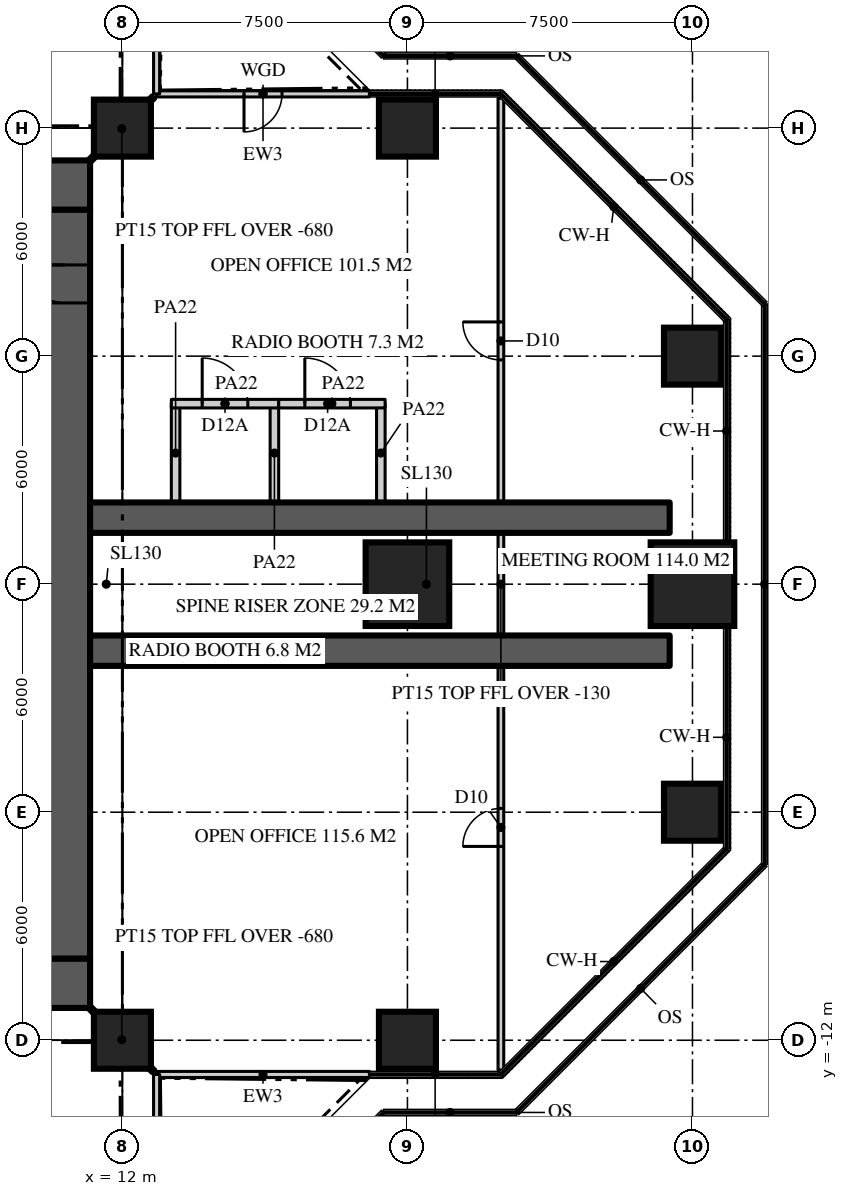
"""IFC4 building model, lengths in metres.
Left out: names, types, materials, properties, quantities, classifications, styles, units other than length and angle.
Written with IfcOpenShell. Run it as: python <this file> out.ifc"""

import sys

from ifc_helpers import new_model, si_unit, direction, frame, frame_2d, origin, origin_2d, place, context, subcontext, project, spatial, rectangle, extrude, element, fill, save


model = new_model("IFC4")
c1 = context("Model", 3, precision=1e-05, world=origin(), true_north=direction((0.0, 1.0)))
c2 = subcontext(c1, "Body", "Model", "MODEL_VIEW")
j1 = project(units=[si_unit("LENGTHUNIT", "METRE"), si_unit("PLANEANGLEUNIT", "RADIAN")], contexts=[c1])
p1 = place(None, origin())
s1 = spatial("IfcSite", under=j1, at=p1, CompositionType="ELEMENT")
p2 = place(p1, origin())
s2 = spatial("IfcBuilding", under=s1, at=p2, CompositionType="ELEMENT")
p3 = place(p2, frame((0.0, 0.0, 212.7)))
s3 = spatial("IfcBuildingStorey", under=s2, at=p3, CompositionType="ELEMENT", Elevation=212.7)
p4 = place(p3, frame((-11.15, 10.5, 0.0), z_axis=(0.0, 0.0, 1.0), x_axis=(1.0, 0.0, 0.0)))
e1 = element("IfcWall", 1, at=p4, inside=s3, PredefinedType="SHEAR", context=c2, shape_type="SweptSolid", body=[
    extrude(rectangle(XDim=22.3, YDim=1.3, at=frame_2d((11.15, 0.0))), origin(), (0.0, 0.0, 1.0), 3.9),
])
p5 = place(p4, frame((4.25, 0.0, 0.0)))
e2 = element("IfcOpeningElement", 2, at=p5, cuts=e1, PredefinedType="OPENING", context=c2, shape_type="SweptSolid", body=[
    extrude(rectangle(XDim=1.8, YDim=2.2, at=frame_2d((0.9, 1.1))), frame((0.0, 0.66, 0.0), z_axis=(0.0, -1.0, 0.0), x_axis=(1.0, 0.0, 0.0)), (0.0, 0.0, 1.0), 1.32),
])
p6 = place(p4, frame((16.25, 0.0, 0.0)))
e3 = element("IfcOpeningElement", 3, at=p6, cuts=e1, PredefinedType="OPENING", context=c2, shape_type="SweptSolid", body=[
    extrude(rectangle(XDim=1.8, YDim=2.2, at=frame_2d((0.9, 1.1))), frame((0.0, 0.66, 0.0), z_axis=(0.0, -1.0, 0.0), x_axis=(1.0, 0.0, 0.0)), (0.0, 0.0, 1.0), 1.32),
])
p7 = place(p3, frame((11.15, -10.5, 0.0), z_axis=(0.0, 0.0, 1.0), x_axis=(-1.0, 0.0, 0.0)))
e4 = element("IfcWall", 4, at=p7, inside=s3, PredefinedType="SHEAR", context=c2, shape_type="SweptSolid", body=[
    extrude(rectangle(XDim=22.3, YDim=1.3, at=frame_2d((11.15, 0.0))), origin(), (0.0, 0.0, 1.0), 3.9),
])
p8 = place(p7, frame((16.25, 0.0, 0.0)))
e5 = element("IfcOpeningElement", 5, at=p8, cuts=e4, PredefinedType="OPENING", context=c2, shape_type="SweptSolid", body=[
    extrude(rectangle(XDim=1.8, YDim=2.2, at=frame_2d((0.9, 1.1))), frame((0.0, 0.66, 0.0), z_axis=(0.0, -1.0, 0.0), x_axis=(1.0, 0.0, 0.0)), (0.0, 0.0, 1.0), 1.32),
])
p9 = place(p7, frame((4.25, 0.0, 0.0)))
e6 = element("IfcOpeningElement", 6, at=p9, cuts=e4, PredefinedType="OPENING", context=c2, shape_type="SweptSolid", body=[
    extrude(rectangle(XDim=1.8, YDim=2.2, at=frame_2d((0.9, 1.1))), frame((0.0, 0.66, 0.0), z_axis=(0.0, -1.0, 0.0), x_axis=(1.0, 0.0, 0.0)), (0.0, 0.0, 1.0), 1.32),
])
p10 = place(p3, frame((10.5, -9.85, 0.0), z_axis=(0.0, 0.0, 1.0), x_axis=(0.0, 1.0, 0.0)))
e7 = element("IfcWall", 7, at=p10, inside=s3, PredefinedType="SHEAR", context=c2, shape_type="SweptSolid", body=[
    extrude(rectangle(XDim=19.7, YDim=1.3, at=frame_2d((9.85, 0.0))), origin(), (0.0, 0.0, 1.0), 3.9),
])
p11 = place(p10, frame((17.25, 0.0, 0.0)))
e8 = element("IfcOpeningElement", 8, at=p11, cuts=e7, PredefinedType="OPENING", context=c2, shape_type="SweptSolid", body=[
    extrude(rectangle(XDim=1.0, YDim=2.2, at=frame_2d((0.5, 1.1))), frame((0.0, 0.66, 0.0), z_axis=(0.0, -1.0, 0.0), x_axis=(1.0, 0.0, 0.0)), (0.0, 0.0, 1.0), 1.32),
])
for number, where, z_axis, x_axis in (
    (9, (11.15, -1.75, 0.0), (0.0, 0.0, 1.0), (1.0, 0.0, 0.0)),
    (10, (11.15, 1.75, 0.0), (0.0, 0.0, 1.0), (1.0, 0.0, 0.0)),
):
    element("IfcWall", number, at=place(p3, frame(where, z_axis=z_axis, x_axis=x_axis)), inside=s3, PredefinedType="SHEAR", context=c2, shape_type="SweptSolid", body=[
        extrude(rectangle(XDim=15.25, YDim=0.8, at=frame_2d((7.625, 0.0))), origin(), (0.0, 0.0, 1.0), 3.9),
    ])
for number, where, z_axis, x_axis in (
    (11, (12.0, -12.0, 0.0), (0.0, 0.0, 1.0), (1.0, 0.0, 0.0)),
    (12, (19.5, -12.0, 0.0), (0.0, 0.0, 1.0), (1.0, 0.0, 0.0)),
    (13, (27.0, -6.0, 0.0), (0.0, 0.0, 1.0), (1.0, 0.0, 0.0)),
):
    element("IfcColumn", number, at=place(p3, frame(where, z_axis=z_axis, x_axis=x_axis)), inside=s3, PredefinedType="COLUMN", context=c2, shape_type="SweptSolid", body=[
        extrude(rectangle(XDim=1.5, YDim=1.5, at=origin_2d()), origin(), (0.0, 0.0, 1.0), 3.9),
    ])
for number, where, z_axis, x_axis in (
    (14, (19.5, 0.0, 0.0), (0.0, 0.0, 1.0), (1.0, 0.0, 0.0)),
    (15, (27.0, 0.0, 0.0), (0.0, 0.0, 1.0), (1.0, 0.0, 0.0)),
):
    element("IfcColumn", number, at=place(p3, frame(where, z_axis=z_axis, x_axis=x_axis)), inside=s3, PredefinedType="COLUMN", context=c2, shape_type="SweptSolid", body=[
        extrude(rectangle(XDim=2.2, YDim=2.2, at=origin_2d()), origin(), (0.0, 0.0, 1.0), 3.9),
    ])
for number, where, z_axis, x_axis in (
    (16, (27.0, 6.0, 0.0), (0.0, 0.0, 1.0), (1.0, 0.0, 0.0)),
    (17, (12.0, 12.0, 0.0), (0.0, 0.0, 1.0), (1.0, 0.0, 0.0)),
    (18, (19.5, 12.0, 0.0), (0.0, 0.0, 1.0), (1.0, 0.0, 0.0)),
):
    element("IfcColumn", number, at=place(p3, frame(where, z_axis=z_axis, x_axis=x_axis)), inside=s3, PredefinedType="COLUMN", context=c2, shape_type="SweptSolid", body=[
        extrude(rectangle(XDim=1.5, YDim=1.5, at=origin_2d()), origin(), (0.0, 0.0, 1.0), 3.9),
    ])
p12 = place(p3, frame((12.9, -12.9, 0.0), z_axis=(0.0, 0.0, 1.0), x_axis=(1.0, 0.0, 0.0)))
e19 = element("IfcWall", 19, at=p12, inside=s3, PredefinedType="SOLIDWALL", context=c2, shape_type="SweptSolid", body=[
    extrude(rectangle(XDim=5.6, YDim=0.16, at=frame_2d((2.8, 0.0))), origin(), (0.0, 0.0, 1.0), 3.77),
])
p13 = place(p3, frame((18.5, 12.9, 0.0), z_axis=(0.0, 0.0, 1.0), x_axis=(-1.0, 0.0, 0.0)))
e20 = element("IfcWall", 20, at=p13, inside=s3, PredefinedType="SOLIDWALL", context=c2, shape_type="SweptSolid", body=[
    extrude(rectangle(XDim=5.6, YDim=0.16, at=frame_2d((2.8, 0.0))), origin(), (0.0, 0.0, 1.0), 3.77),
])
p14 = place(p13, frame((2.3, 0.0, 0.0)))
e21 = element("IfcOpeningElement", 21, at=p14, cuts=e20, PredefinedType="OPENING", context=c2, shape_type="SweptSolid", body=[
    extrude(rectangle(XDim=1.0, YDim=2.2, at=frame_2d((0.5, 1.1))), frame((0.0, 0.09, 0.0), z_axis=(0.0, -1.0, 0.0), x_axis=(1.0, 0.0, 0.0)), (0.0, 0.0, 1.0), 0.18),
])
p15 = place(p3, frame((12.9, 12.9, 0.0), z_axis=(0.0, 0.0, 1.0), x_axis=(0.0, 1.0, 0.0)))
e22 = element("IfcWall", 22, at=p15, inside=s3, PredefinedType="SOLIDWALL", context=c2, shape_type="SweptSolid", body=[
    extrude(rectangle(XDim=5.6, YDim=0.16, at=frame_2d((2.8, 0.0))), origin(), (0.0, 0.0, 1.0), 3.77),
])
p16 = place(p3, frame((12.9, -18.5, 0.0), z_axis=(0.0, 0.0, 1.0), x_axis=(0.0, 1.0, 0.0)))
e23 = element("IfcWall", 23, at=p16, inside=s3, PredefinedType="SOLIDWALL", context=c2, shape_type="SweptSolid", body=[
    extrude(rectangle(XDim=5.6, YDim=0.16, at=frame_2d((2.8, 0.0))), origin(), (0.0, 0.0, 1.0), 3.77),
])
p17 = place(p16, frame((2.3, 0.0, 0.0)))
e24 = element("IfcOpeningElement", 24, at=p17, cuts=e23, PredefinedType="OPENING", context=c2, shape_type="SweptSolid", body=[
    extrude(rectangle(XDim=1.0, YDim=2.2, at=frame_2d((0.5, 1.1))), frame((0.0, 0.09, 0.0), z_axis=(0.0, -1.0, 0.0), x_axis=(1.0, 0.0, 0.0)), (0.0, 0.0, 1.0), 0.18),
])
p18 = place(p3, frame((21.959, -12.786, 0.0), z_axis=(0.0, 0.0, 1.0), x_axis=(0.0, 1.0, 0.0)))
e25 = element("IfcWall", 25, at=p18, inside=s3, PredefinedType="PARTITIONING", context=c2, shape_type="SweptSolid", body=[
    extrude(rectangle(XDim=25.573, YDim=0.15, at=frame_2d((12.786, 0.0))), origin(), (0.0, 0.0, 1.0), 3.77),
])
p19 = place(p18, frame((18.687, 0.0, 0.0)))
e26 = element("IfcOpeningElement", 26, at=p19, cuts=e25, PredefinedType="OPENING", context=c2, shape_type="SweptSolid", body=[
    extrude(rectangle(XDim=1.0, YDim=2.2, at=frame_2d((0.5, 1.1))), frame((0.0, 0.085, 0.0), z_axis=(0.0, -1.0, 0.0), x_axis=(1.0, 0.0, 0.0)), (0.0, 0.0, 1.0), 0.17),
])
p20 = place(p18, frame((5.886, 0.0, 0.0)))
e27 = element("IfcOpeningElement", 27, at=p20, cuts=e25, PredefinedType="OPENING", context=c2, shape_type="SweptSolid", body=[
    extrude(rectangle(XDim=1.0, YDim=2.2, at=frame_2d((0.5, 1.1))), frame((0.0, 0.085, 0.0), z_axis=(0.0, -1.0, 0.0), x_axis=(1.0, 0.0, 0.0)), (0.0, 0.0, 1.0), 0.17),
])
for number, where, z_axis, x_axis in (
    (28, (13.4, 2.15, 0.0), (0.0, 0.0, 1.0), (0.0, 1.0, 0.0)),
    (29, (16.0, 2.15, 0.0), (0.0, 0.0, 1.0), (0.0, 1.0, 0.0)),
):
    element("IfcWall", number, at=place(p3, frame(where, z_axis=z_axis, x_axis=x_axis)), inside=s3, PredefinedType="PARTITIONING", context=c2, shape_type="SweptSolid", body=[
        extrude(rectangle(XDim=2.6, YDim=0.225, at=frame_2d((1.3, 0.0))), origin(), (0.0, 0.0, 1.0), 3.77),
    ])
p21 = place(p3, frame((13.288, 4.75, 0.0), z_axis=(0.0, 0.0, 1.0), x_axis=(1.0, 0.0, 0.0)))
e30 = element("IfcWall", 30, at=p21, inside=s3, PredefinedType="PARTITIONING", context=c2, shape_type="SweptSolid", body=[
    extrude(rectangle(XDim=2.825, YDim=0.225, at=frame_2d((1.413, 0.0))), origin(), (0.0, 0.0, 1.0), 3.77),
])
p22 = place(p21, frame((0.812, 0.0, 0.0)))
e31 = element("IfcOpeningElement", 31, at=p22, cuts=e30, PredefinedType="OPENING", context=c2, shape_type="SweptSolid", body=[
    extrude(rectangle(XDim=1.2, YDim=2.2, at=frame_2d((0.6, 1.1))), frame((0.0, 0.123, 0.0), z_axis=(0.0, -1.0, 0.0), x_axis=(1.0, 0.0, 0.0)), (0.0, 0.0, 1.0), 0.245),
])
p23 = place(p3, frame((18.8, 2.15, 0.0), z_axis=(0.0, 0.0, 1.0), x_axis=(0.0, 1.0, 0.0)))
e32 = element("IfcWall", 32, at=p23, inside=s3, PredefinedType="PARTITIONING", context=c2, shape_type="SweptSolid", body=[
    extrude(rectangle(XDim=2.6, YDim=0.225, at=frame_2d((1.3, 0.0))), origin(), (0.0, 0.0, 1.0), 3.77),
])
p24 = place(p3, frame((16.113, 4.75, 0.0), z_axis=(0.0, 0.0, 1.0), x_axis=(1.0, 0.0, 0.0)))
e33 = element("IfcWall", 33, at=p24, inside=s3, PredefinedType="PARTITIONING", context=c2, shape_type="SweptSolid", body=[
    extrude(rectangle(XDim=2.8, YDim=0.225, at=frame_2d((1.4, 0.0))), origin(), (0.0, 0.0, 1.0), 3.77),
])
p25 = place(p24, frame((0.688, 0.0, 0.0)))
e34 = element("IfcOpeningElement", 34, at=p25, cuts=e33, PredefinedType="OPENING", context=c2, shape_type="SweptSolid", body=[
    extrude(rectangle(XDim=1.2, YDim=2.2, at=frame_2d((0.6, 1.1))), frame((0.0, 0.123, 0.0), z_axis=(0.0, -1.0, 0.0), x_axis=(1.0, 0.0, 0.0)), (0.0, 0.0, 1.0), 0.245),
])
for number, where, z_axis, x_axis in (
    (35, (11.15, 11.15, 0.0), (0.0, 0.0, 1.0), (0.707, 0.707, 0.0)),
    (36, (11.15, -11.15, 0.0), (0.0, 0.0, 1.0), (0.707, -0.707, 0.0)),
):
    element("IfcWall", number, at=place(p3, frame(where, z_axis=z_axis, x_axis=x_axis)), inside=s3, PredefinedType="PARTITIONING", context=c2, shape_type="SweptSolid", body=[
        extrude(rectangle(XDim=2.362, YDim=0.15, at=frame_2d((1.181, 0.0))), origin(), (0.0, 0.0, 1.0), 3.22),
    ])
p26 = place(p14, origin())
e37 = element("IfcDoor", 37, at=p26, inside=s3, OperationType="SINGLE_SWING_RIGHT", PredefinedType="DOOR", context=c2, shape_type="SweptSolid", body=[
    extrude(rectangle(XDim=1.0, YDim=2.2, at=frame_2d((0.5, 1.1))), frame((0.0, 0.025, 0.0), z_axis=(0.0, -1.0, 0.0), x_axis=(1.0, 0.0, 0.0)), (0.0, 0.0, 1.0), 0.05),
])
fill(e21, e37)
p27 = place(p11, origin())
e38 = element("IfcDoor", 38, at=p27, inside=s3, OperationType="SINGLE_SWING_RIGHT", PredefinedType="DOOR", context=c2, shape_type="SweptSolid", body=[
    extrude(rectangle(XDim=1.0, YDim=2.2, at=frame_2d((0.5, 1.1))), frame((0.0, 0.025, 0.0), z_axis=(0.0, -1.0, 0.0), x_axis=(1.0, 0.0, 0.0)), (0.0, 0.0, 1.0), 0.05),
])
fill(e8, e38)
p28 = place(p19, origin())
e39 = element("IfcDoor", 39, at=p28, inside=s3, OperationType="SINGLE_SWING_RIGHT", PredefinedType="DOOR", context=c2, shape_type="SweptSolid", body=[
    extrude(rectangle(XDim=1.0, YDim=2.2, at=frame_2d((0.5, 1.1))), frame((0.0, 0.025, 0.0), z_axis=(0.0, -1.0, 0.0), x_axis=(1.0, 0.0, 0.0)), (0.0, 0.0, 1.0), 0.05),
])
fill(e26, e39)
p29 = place(p20, origin())
e40 = element("IfcDoor", 40, at=p29, inside=s3, OperationType="SINGLE_SWING_LEFT", PredefinedType="DOOR", context=c2, shape_type="SweptSolid", body=[
    extrude(rectangle(XDim=1.0, YDim=2.2, at=frame_2d((0.5, 1.1))), frame((0.0, 0.025, 0.0), z_axis=(0.0, -1.0, 0.0), x_axis=(1.0, 0.0, 0.0)), (0.0, 0.0, 1.0), 0.05),
])
fill(e27, e40)
p30 = place(p22, origin())
e41 = element("IfcDoor", 41, at=p30, inside=s3, OperationType="SINGLE_SWING_LEFT", PredefinedType="DOOR", context=c2, shape_type="SweptSolid", body=[
    extrude(rectangle(XDim=1.2, YDim=2.2, at=frame_2d((0.6, 1.1))), frame((0.0, 0.025, 0.0), z_axis=(0.0, -1.0, 0.0), x_axis=(1.0, 0.0, 0.0)), (0.0, 0.0, 1.0), 0.05),
])
fill(e31, e41)
p31 = place(p25, origin())
e42 = element("IfcDoor", 42, at=p31, inside=s3, OperationType="SINGLE_SWING_LEFT", PredefinedType="DOOR", context=c2, shape_type="SweptSolid", body=[
    extrude(rectangle(XDim=1.2, YDim=2.2, at=frame_2d((0.6, 1.1))), frame((0.0, 0.025, 0.0), z_axis=(0.0, -1.0, 0.0), x_axis=(1.0, 0.0, 0.0)), (0.0, 0.0, 1.0), 0.05),
])
fill(e34, e42)
save(model, sys.argv[1])
